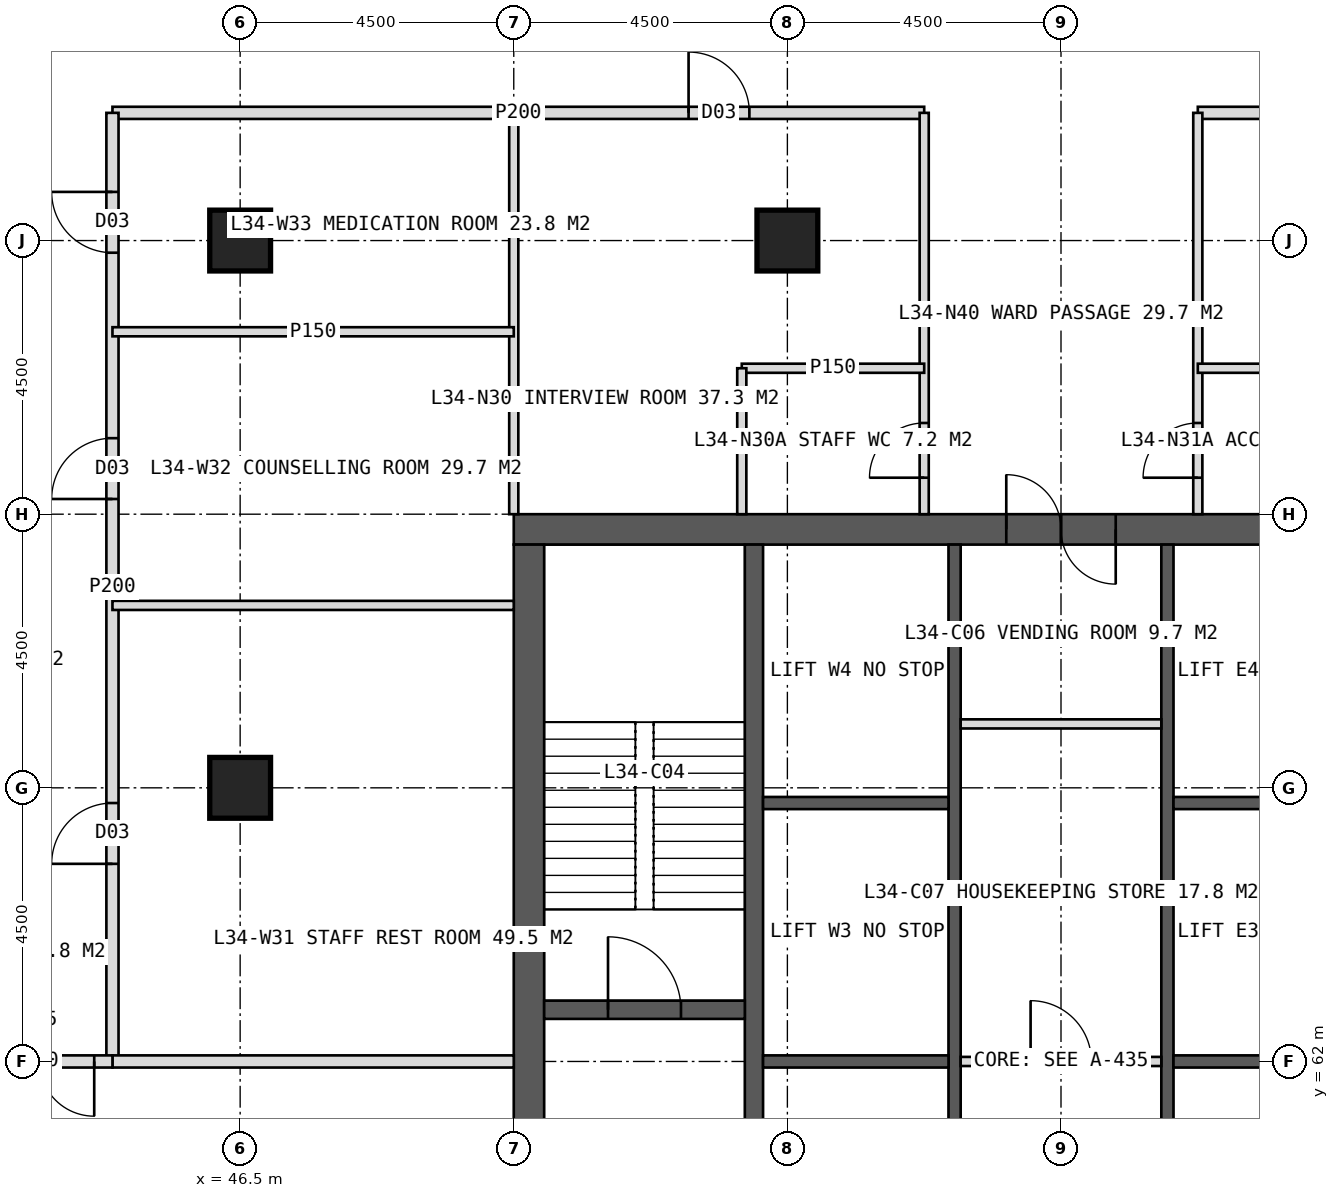
"""IFC4 building model, lengths in metres.
Left out: names, types, materials, properties, quantities, classifications, styles, units other than length and angle.
Written with IfcOpenShell. Run it as: python <this file> out.ifc"""

import sys

from ifc_helpers import new_model, si_unit, direction, frame, frame_2d, origin, origin_2d, place, context, subcontext, project, spatial, rectangle, hollow_rectangle, extrude, element, fill, save


model = new_model("IFC4")
c1 = context("Model", 3, precision=1e-05, world=origin(), true_north=direction((0.0, 1.0)))
c2 = subcontext(c1, "Body", "Model", "MODEL_VIEW")
j1 = project(units=[si_unit("LENGTHUNIT", "METRE"), si_unit("PLANEANGLEUNIT", "RADIAN")], contexts=[c1])
p1 = place(None, origin())
s1 = spatial("IfcSite", under=j1, at=p1, CompositionType="ELEMENT")
p2 = place(p1, origin())
s2 = spatial("IfcBuilding", under=s1, at=p2, CompositionType="ELEMENT")
p3 = place(p2, frame((0.0, 0.0, 144.0)))
s3 = spatial("IfcBuildingStorey", under=s2, at=p3, CompositionType="ELEMENT", Elevation=144.0)
p4 = place(p3, frame((51.0, 70.75, 0.0), z_axis=(0.0, 0.0, 1.0), x_axis=(1.0, 0.0, 0.0)))
e1 = element("IfcWall", 1, at=p4, inside=s3, PredefinedType="SHEAR", context=c2, shape_type="SweptSolid", body=[
    extrude(rectangle(XDim=18.0, YDim=0.5, at=frame_2d((9.0, 0.0))), origin(), (0.0, 0.0, 1.0), 4.0),
])
p5 = place(p4, frame((8.1, 0.0, 0.0)))
e2 = element("IfcOpeningElement", 2, at=p5, cuts=e1, PredefinedType="OPENING", context=c2, shape_type="SweptSolid", body=[
    extrude(rectangle(XDim=1.8, YDim=2.2, at=frame_2d((0.9, 1.1))), frame((0.0, 0.26, 0.0), z_axis=(0.0, -1.0, 0.0), x_axis=(1.0, 0.0, 0.0)), (0.0, 0.0, 1.0), 0.52),
])
p6 = place(p3, frame((51.25, 53.5, 0.0), z_axis=(0.0, 0.0, 1.0), x_axis=(0.0, 1.0, 0.0)))
e3 = element("IfcWall", 3, at=p6, inside=s3, PredefinedType="SHEAR", context=c2, shape_type="SweptSolid", body=[
    extrude(rectangle(XDim=17.0, YDim=0.5, at=frame_2d((8.5, 0.0))), origin(), (0.0, 0.0, 1.0), 4.0),
])
p7 = place(p6, frame((6.0, 0.0, 0.0)))
e4 = element("IfcOpeningElement", 4, at=p7, cuts=e3, PredefinedType="OPENING", context=c2, shape_type="SweptSolid", body=[
    extrude(rectangle(XDim=1.5, YDim=2.2, at=frame_2d((0.75, 1.1))), frame((0.0, 0.26, 0.0), z_axis=(0.0, -1.0, 0.0), x_axis=(1.0, 0.0, 0.0)), (0.0, 0.0, 1.0), 0.52),
])
p8 = place(p3, frame((54.95, 53.5, 0.0), z_axis=(0.0, 0.0, 1.0), x_axis=(0.0, 1.0, 0.0)))
e5 = element("IfcWall", 5, at=p8, inside=s3, PredefinedType="SHEAR", context=c2, shape_type="SweptSolid", body=[
    extrude(rectangle(XDim=17.0, YDim=0.3, at=frame_2d((8.5, 0.0))), origin(), (0.0, 0.0, 1.0), 4.0),
])
p9 = place(p3, frame((58.25, 53.5, 0.0), z_axis=(0.0, 0.0, 1.0), x_axis=(0.0, 1.0, 0.0)))
e6 = element("IfcWall", 6, at=p9, inside=s3, PredefinedType="SHEAR", context=c2, shape_type="SweptSolid", body=[
    extrude(rectangle(XDim=17.0, YDim=0.2, at=frame_2d((8.5, 0.0))), origin(), (0.0, 0.0, 1.0), 4.0),
])
p10 = place(p9, frame((1.375, 0.0, 0.0)))
e7 = element("IfcOpeningElement", 7, at=p10, cuts=e6, PredefinedType="OPENING", context=c2, shape_type="SweptSolid", body=[
    extrude(rectangle(XDim=1.4, YDim=2.2, at=frame_2d((0.7, 1.1))), frame((0.0, 0.11, 0.0), z_axis=(0.0, -1.0, 0.0), x_axis=(1.0, 0.0, 0.0)), (0.0, 0.0, 1.0), 0.22),
])
p11 = place(p9, frame((5.675, 0.0, 0.0)))
e8 = element("IfcOpeningElement", 8, at=p11, cuts=e6, PredefinedType="OPENING", context=c2, shape_type="SweptSolid", body=[
    extrude(rectangle(XDim=1.4, YDim=2.2, at=frame_2d((0.7, 1.1))), frame((0.0, 0.11, 0.0), z_axis=(0.0, -1.0, 0.0), x_axis=(1.0, 0.0, 0.0)), (0.0, 0.0, 1.0), 0.22),
])
p12 = place(p3, frame((61.75, 53.5, 0.0), z_axis=(0.0, 0.0, 1.0), x_axis=(0.0, 1.0, 0.0)))
e9 = element("IfcWall", 9, at=p12, inside=s3, PredefinedType="SHEAR", context=c2, shape_type="SweptSolid", body=[
    extrude(rectangle(XDim=17.0, YDim=0.2, at=frame_2d((8.5, 0.0))), origin(), (0.0, 0.0, 1.0), 4.0),
])
p13 = place(p12, frame((1.375, 0.0, 0.0)))
e10 = element("IfcOpeningElement", 10, at=p13, cuts=e9, PredefinedType="OPENING", context=c2, shape_type="SweptSolid", body=[
    extrude(rectangle(XDim=1.4, YDim=2.2, at=frame_2d((0.7, 1.1))), frame((0.0, 0.11, 0.0), z_axis=(0.0, -1.0, 0.0), x_axis=(1.0, 0.0, 0.0)), (0.0, 0.0, 1.0), 0.22),
])
p14 = place(p12, frame((5.675, 0.0, 0.0)))
e11 = element("IfcOpeningElement", 11, at=p14, cuts=e9, PredefinedType="OPENING", context=c2, shape_type="SweptSolid", body=[
    extrude(rectangle(XDim=1.4, YDim=2.2, at=frame_2d((0.7, 1.1))), frame((0.0, 0.11, 0.0), z_axis=(0.0, -1.0, 0.0), x_axis=(1.0, 0.0, 0.0)), (0.0, 0.0, 1.0), 0.22),
])
for number, where, z_axis, x_axis in (
    (12, (55.1, 62.0, 0.0), (0.0, 0.0, 1.0), (1.0, 0.0, 0.0)),
    (13, (61.85, 62.0, 0.0), (0.0, 0.0, 1.0), (1.0, 0.0, 0.0)),
    (14, (55.1, 66.25, 0.0), (0.0, 0.0, 1.0), (1.0, 0.0, 0.0)),
    (15, (61.85, 66.25, 0.0), (0.0, 0.0, 1.0), (1.0, 0.0, 0.0)),
):
    element("IfcWall", number, at=place(p3, frame(where, z_axis=z_axis, x_axis=x_axis)), inside=s3, PredefinedType="SHEAR", context=c2, shape_type="SweptSolid", body=[
        extrude(rectangle(XDim=3.05, YDim=0.2, at=frame_2d((1.525, 0.0))), origin(), (0.0, 0.0, 1.0), 4.0),
    ])
p15 = place(p3, frame((51.5, 62.85, 0.0), z_axis=(0.0, 0.0, 1.0), x_axis=(1.0, 0.0, 0.0)))
e16 = element("IfcWall", 16, at=p15, inside=s3, PredefinedType="SHEAR", context=c2, shape_type="SweptSolid", body=[
    extrude(rectangle(XDim=3.3, YDim=0.3, at=frame_2d((1.65, 0.0))), origin(), (0.0, 0.0, 1.0), 4.0),
])
p16 = place(p15, frame((1.05, 0.0, 0.0)))
e17 = element("IfcOpeningElement", 17, at=p16, cuts=e16, PredefinedType="OPENING", context=c2, shape_type="SweptSolid", body=[
    extrude(rectangle(XDim=1.2, YDim=2.1, at=frame_2d((0.6, 1.05))), frame((0.0, 0.16, 0.0), z_axis=(0.0, -1.0, 0.0), x_axis=(1.0, 0.0, 0.0)), (0.0, 0.0, 1.0), 0.32),
])
for number, where, z_axis, x_axis in (
    (18, (46.5, 75.5, 0.0), (0.0, 0.0, 1.0), (1.0, 0.0, 0.0)),
    (19, (55.5, 75.5, 0.0), (0.0, 0.0, 1.0), (1.0, 0.0, 0.0)),
    (20, (46.5, 66.5, 0.0), (0.0, 0.0, 1.0), (1.0, 0.0, 0.0)),
):
    element("IfcColumn", number, at=place(p3, frame(where, z_axis=z_axis, x_axis=x_axis)), inside=s3, PredefinedType="COLUMN", context=c2, shape_type="SweptSolid", body=[
        extrude(hollow_rectangle(XDim=1.0, YDim=1.0, WallThickness=0.1, at=origin_2d()), origin(), (0.0, 0.0, 1.0), 4.0),
    ])
p17 = place(p3, frame((51.0, 71.0, 0.0), z_axis=(0.0, 0.0, 1.0), x_axis=(0.0, 1.0, 0.0)))
e21 = element("IfcWall", 21, at=p17, inside=s3, PredefinedType="PARTITIONING", context=c2, shape_type="SweptSolid", body=[
    extrude(rectangle(XDim=6.6, YDim=0.15, at=frame_2d((3.3, 0.0))), origin(), (0.0, 0.0, 1.0), 3.75),
])
p18 = place(p3, frame((44.4, 77.6, 0.0), z_axis=(0.0, 0.0, 1.0), x_axis=(1.0, 0.0, 0.0)))
e22 = element("IfcWall", 22, at=p18, inside=s3, PredefinedType="PARTITIONING", context=c2, shape_type="SweptSolid", body=[
    extrude(rectangle(XDim=13.35, YDim=0.2, at=frame_2d((6.675, 0.0))), origin(), (0.0, 0.0, 1.0), 3.75),
])
p19 = place(p18, frame((9.475, 0.0, 0.0)))
e23 = element("IfcOpeningElement", 23, at=p19, cuts=e22, PredefinedType="OPENING", context=c2, shape_type="SweptSolid", body=[
    extrude(rectangle(XDim=1.0, YDim=2.1, at=frame_2d((0.5, 1.05))), frame((0.0, 0.11, 0.0), z_axis=(0.0, -1.0, 0.0), x_axis=(1.0, 0.0, 0.0)), (0.0, 0.0, 1.0), 0.22),
])
p20 = place(p3, frame((62.25, 77.6, 0.0), z_axis=(0.0, 0.0, 1.0), x_axis=(1.0, 0.0, 0.0)))
e24 = element("IfcWall", 24, at=p20, inside=s3, PredefinedType="PARTITIONING", context=c2, shape_type="SweptSolid", body=[
    extrude(rectangle(XDim=6.75, YDim=0.2, at=frame_2d((3.375, 0.0))), origin(), (0.0, 0.0, 1.0), 3.75),
])
p21 = place(p20, frame((2.125, 0.0, 0.0)))
e25 = element("IfcOpeningElement", 25, at=p21, cuts=e24, PredefinedType="OPENING", context=c2, shape_type="SweptSolid", body=[
    extrude(rectangle(XDim=1.0, YDim=2.1, at=frame_2d((0.5, 1.05))), frame((0.0, 0.11, 0.0), z_axis=(0.0, -1.0, 0.0), x_axis=(1.0, 0.0, 0.0)), (0.0, 0.0, 1.0), 0.22),
])
p22 = place(p3, frame((57.75, 71.0, 0.0), z_axis=(0.0, 0.0, 1.0), x_axis=(0.0, 1.0, 0.0)))
e26 = element("IfcWall", 26, at=p22, inside=s3, PredefinedType="PARTITIONING", context=c2, shape_type="SweptSolid", body=[
    extrude(rectangle(XDim=6.6, YDim=0.15, at=frame_2d((3.3, 0.0))), origin(), (0.0, 0.0, 1.0), 3.75),
])
p23 = place(p22, frame((0.6, 0.0, 0.0)))
e27 = element("IfcOpeningElement", 27, at=p23, cuts=e26, PredefinedType="OPENING", context=c2, shape_type="SweptSolid", body=[
    extrude(rectangle(XDim=0.9, YDim=2.1, at=frame_2d((0.45, 1.05))), frame((0.0, 0.085, 0.0), z_axis=(0.0, -1.0, 0.0), x_axis=(1.0, 0.0, 0.0)), (0.0, 0.0, 1.0), 0.17),
])
p24 = place(p3, frame((62.25, 71.0, 0.0), z_axis=(0.0, 0.0, 1.0), x_axis=(0.0, 1.0, 0.0)))
e28 = element("IfcWall", 28, at=p24, inside=s3, PredefinedType="PARTITIONING", context=c2, shape_type="SweptSolid", body=[
    extrude(rectangle(XDim=6.6, YDim=0.15, at=frame_2d((3.3, 0.0))), origin(), (0.0, 0.0, 1.0), 3.75),
])
p25 = place(p24, frame((0.6, 0.0, 0.0)))
e29 = element("IfcOpeningElement", 29, at=p25, cuts=e28, PredefinedType="OPENING", context=c2, shape_type="SweptSolid", body=[
    extrude(rectangle(XDim=0.9, YDim=2.1, at=frame_2d((0.45, 1.05))), frame((0.0, 0.085, 0.0), z_axis=(0.0, -1.0, 0.0), x_axis=(1.0, 0.0, 0.0)), (0.0, 0.0, 1.0), 0.17),
])
p26 = place(p3, frame((54.75, 73.4, 0.0), z_axis=(0.0, 0.0, 1.0), x_axis=(1.0, 0.0, 0.0)))
e30 = element("IfcWall", 30, at=p26, inside=s3, PredefinedType="PARTITIONING", context=c2, shape_type="SweptSolid", body=[
    extrude(rectangle(XDim=3.0, YDim=0.15, at=frame_2d((1.5, 0.0))), origin(), (0.0, 0.0, 1.0), 3.75),
])
p27 = place(p3, frame((54.75, 71.0, 0.0), z_axis=(0.0, 0.0, 1.0), x_axis=(0.0, 1.0, 0.0)))
e31 = element("IfcWall", 31, at=p27, inside=s3, PredefinedType="PARTITIONING", context=c2, shape_type="SweptSolid", body=[
    extrude(rectangle(XDim=2.4, YDim=0.15, at=frame_2d((1.2, 0.0))), origin(), (0.0, 0.0, 1.0), 3.75),
])
p28 = place(p3, frame((62.25, 73.4, 0.0), z_axis=(0.0, 0.0, 1.0), x_axis=(1.0, 0.0, 0.0)))
e32 = element("IfcWall", 32, at=p28, inside=s3, PredefinedType="PARTITIONING", context=c2, shape_type="SweptSolid", body=[
    extrude(rectangle(XDim=3.0, YDim=0.15, at=frame_2d((1.5, 0.0))), origin(), (0.0, 0.0, 1.0), 3.75),
])
p29 = place(p3, frame((44.4, 62.0, 0.0), z_axis=(0.0, 0.0, 1.0), x_axis=(0.0, 1.0, 0.0)))
e33 = element("IfcWall", 33, at=p29, inside=s3, PredefinedType="PARTITIONING", context=c2, shape_type="SweptSolid", body=[
    extrude(rectangle(XDim=15.6, YDim=0.2, at=frame_2d((7.8, 0.0))), origin(), (0.0, 0.0, 1.0), 3.75),
])
p30 = place(p29, frame((3.25, 0.0, 0.0)))
e34 = element("IfcOpeningElement", 34, at=p30, cuts=e33, PredefinedType="OPENING", context=c2, shape_type="SweptSolid", body=[
    extrude(rectangle(XDim=1.0, YDim=2.1, at=frame_2d((0.5, 1.05))), frame((0.0, 0.11, 0.0), z_axis=(0.0, -1.0, 0.0), x_axis=(1.0, 0.0, 0.0)), (0.0, 0.0, 1.0), 0.22),
])
p31 = place(p29, frame((9.25, 0.0, 0.0)))
e35 = element("IfcOpeningElement", 35, at=p31, cuts=e33, PredefinedType="OPENING", context=c2, shape_type="SweptSolid", body=[
    extrude(rectangle(XDim=1.0, YDim=2.1, at=frame_2d((0.5, 1.05))), frame((0.0, 0.11, 0.0), z_axis=(0.0, -1.0, 0.0), x_axis=(1.0, 0.0, 0.0)), (0.0, 0.0, 1.0), 0.22),
])
p32 = place(p29, frame((13.3, 0.0, 0.0)))
e36 = element("IfcOpeningElement", 36, at=p32, cuts=e33, PredefinedType="OPENING", context=c2, shape_type="SweptSolid", body=[
    extrude(rectangle(XDim=1.0, YDim=2.1, at=frame_2d((0.5, 1.05))), frame((0.0, 0.11, 0.0), z_axis=(0.0, -1.0, 0.0), x_axis=(1.0, 0.0, 0.0)), (0.0, 0.0, 1.0), 0.22),
])
p33 = place(p3, frame((51.0, 62.0, 0.0), z_axis=(0.0, 0.0, 1.0), x_axis=(-1.0, 0.0, 0.0)))
e37 = element("IfcWall", 37, at=p33, inside=s3, PredefinedType="SOLIDWALL", context=c2, shape_type="SweptSolid", body=[
    extrude(rectangle(XDim=6.6, YDim=0.2, at=frame_2d((3.3, 0.0))), origin(), (0.0, 0.0, 1.0), 2.95),
])
for number, where, z_axis, x_axis in (
    (38, (51.0, 69.5, 0.0), (0.0, 0.0, 1.0), (-1.0, 0.0, 0.0)),
    (39, (51.0, 74.0, 0.0), (0.0, 0.0, 1.0), (-1.0, 0.0, 0.0)),
):
    element("IfcWall", number, at=place(p3, frame(where, z_axis=z_axis, x_axis=x_axis)), inside=s3, PredefinedType="PARTITIONING", context=c2, shape_type="SweptSolid", body=[
        extrude(rectangle(XDim=6.6, YDim=0.15, at=frame_2d((3.3, 0.0))), origin(), (0.0, 0.0, 1.0), 3.75),
    ])
p34 = place(p3, frame((44.4, 62.0, 0.0), z_axis=(0.0, 0.0, 1.0), x_axis=(-1.0, 0.0, 0.0)))
e40 = element("IfcWall", 40, at=p34, inside=s3, PredefinedType="SOLIDWALL", context=c2, shape_type="SweptSolid", body=[
    extrude(rectangle(XDim=2.7, YDim=0.2, at=frame_2d((1.35, 0.0))), origin(), (0.0, 0.0, 1.0), 2.95),
])
p35 = place(p34, frame((0.3, 0.0, 0.0)))
e41 = element("IfcOpeningElement", 41, at=p35, cuts=e40, PredefinedType="OPENING", context=c2, shape_type="SweptSolid", body=[
    extrude(rectangle(XDim=1.8, YDim=2.2, at=frame_2d((0.9, 1.1))), frame((0.0, 0.11, 0.0), z_axis=(0.0, -1.0, 0.0), x_axis=(1.0, 0.0, 0.0)), (0.0, 0.0, 1.0), 0.22),
])
p36 = place(p3, frame((58.35, 62.0, 0.0), z_axis=(0.0, 0.0, 1.0), x_axis=(1.0, 0.0, 0.0)))
e42 = element("IfcWall", 42, at=p36, inside=s3, PredefinedType="PARTITIONING", context=c2, shape_type="SweptSolid", body=[
    extrude(rectangle(XDim=3.3, YDim=0.15, at=frame_2d((1.65, 0.0))), origin(), (0.0, 0.0, 1.0), 3.75),
])
p37 = place(p36, frame((1.15, 0.0, 0.0)))
e43 = element("IfcOpeningElement", 43, at=p37, cuts=e42, PredefinedType="OPENING", context=c2, shape_type="SweptSolid", body=[
    extrude(rectangle(XDim=1.0, YDim=2.1, at=frame_2d((0.5, 1.05))), frame((0.0, 0.085, 0.0), z_axis=(0.0, -1.0, 0.0), x_axis=(1.0, 0.0, 0.0)), (0.0, 0.0, 1.0), 0.17),
])
p38 = place(p3, frame((58.35, 67.551, 0.0), z_axis=(0.0, 0.0, 1.0), x_axis=(1.0, 0.0, 0.0)))
e44 = element("IfcWall", 44, at=p38, inside=s3, PredefinedType="PARTITIONING", context=c2, shape_type="SweptSolid", body=[
    extrude(rectangle(XDim=3.3, YDim=0.15, at=frame_2d((1.65, 0.0))), origin(), (0.0, 0.0, 1.0), 3.75),
])
p39 = place(p23, origin())
e45 = element("IfcDoor", 45, at=p39, inside=s3, OperationType="SINGLE_SWING_LEFT", PredefinedType="DOOR", context=c2, shape_type="SweptSolid", body=[
    extrude(rectangle(XDim=0.9, YDim=2.1, at=frame_2d((0.45, 1.05))), frame((0.0, 0.025, 0.0), z_axis=(0.0, -1.0, 0.0), x_axis=(1.0, 0.0, 0.0)), (0.0, 0.0, 1.0), 0.05),
])
fill(e27, e45)
p40 = place(p19, origin())
e46 = element("IfcDoor", 46, at=p40, inside=s3, OperationType="SINGLE_SWING_LEFT", PredefinedType="DOOR", context=c2, shape_type="SweptSolid", body=[
    extrude(rectangle(XDim=1.0, YDim=2.1, at=frame_2d((0.5, 1.05))), frame((0.0, 0.025, 0.0), z_axis=(0.0, -1.0, 0.0), x_axis=(1.0, 0.0, 0.0)), (0.0, 0.0, 1.0), 0.05),
])
fill(e23, e46)
p41 = place(p25, origin())
e47 = element("IfcDoor", 47, at=p41, inside=s3, OperationType="SINGLE_SWING_LEFT", PredefinedType="DOOR", context=c2, shape_type="SweptSolid", body=[
    extrude(rectangle(XDim=0.9, YDim=2.1, at=frame_2d((0.45, 1.05))), frame((0.0, 0.025, 0.0), z_axis=(0.0, -1.0, 0.0), x_axis=(1.0, 0.0, 0.0)), (0.0, 0.0, 1.0), 0.05),
])
fill(e29, e47)
p42 = place(p30, origin())
e48 = element("IfcDoor", 48, at=p42, inside=s3, OperationType="SINGLE_SWING_LEFT", PredefinedType="DOOR", context=c2, shape_type="SweptSolid", body=[
    extrude(rectangle(XDim=1.0, YDim=2.1, at=frame_2d((0.5, 1.05))), frame((0.0, 0.025, 0.0), z_axis=(0.0, -1.0, 0.0), x_axis=(1.0, 0.0, 0.0)), (0.0, 0.0, 1.0), 0.05),
])
fill(e34, e48)
p43 = place(p31, origin())
e49 = element("IfcDoor", 49, at=p43, inside=s3, OperationType="SINGLE_SWING_LEFT", PredefinedType="DOOR", context=c2, shape_type="SweptSolid", body=[
    extrude(rectangle(XDim=1.0, YDim=2.1, at=frame_2d((0.5, 1.05))), frame((0.0, 0.025, 0.0), z_axis=(0.0, -1.0, 0.0), x_axis=(1.0, 0.0, 0.0)), (0.0, 0.0, 1.0), 0.05),
])
fill(e35, e49)
p44 = place(p32, origin())
e50 = element("IfcDoor", 50, at=p44, inside=s3, OperationType="SINGLE_SWING_RIGHT", PredefinedType="DOOR", context=c2, shape_type="SweptSolid", body=[
    extrude(rectangle(XDim=1.0, YDim=2.1, at=frame_2d((0.5, 1.05))), frame((0.0, 0.025, 0.0), z_axis=(0.0, -1.0, 0.0), x_axis=(1.0, 0.0, 0.0)), (0.0, 0.0, 1.0), 0.05),
])
fill(e36, e50)
p45 = place(p35, origin())
e51 = element("IfcDoor", 51, at=p45, inside=s3, OperationType="DOUBLE_DOOR_DOUBLE_SWING", PredefinedType="DOOR", context=c2, shape_type="SweptSolid", body=[
    extrude(rectangle(XDim=1.8, YDim=2.2, at=frame_2d((0.9, 1.1))), frame((0.0, 0.025, 0.0), z_axis=(0.0, -1.0, 0.0), x_axis=(1.0, 0.0, 0.0)), (0.0, 0.0, 1.0), 0.05),
])
fill(e41, e51)
p46 = place(p16, origin())
e52 = element("IfcDoor", 52, at=p46, inside=s3, OperationType="SINGLE_SWING_LEFT", PredefinedType="DOOR", context=c2, shape_type="SweptSolid", body=[
    extrude(rectangle(XDim=1.2, YDim=2.1, at=frame_2d((0.6, 1.05))), frame((0.0, 0.025, 0.0), z_axis=(0.0, -1.0, 0.0), x_axis=(1.0, 0.0, 0.0)), (0.0, 0.0, 1.0), 0.05),
])
fill(e17, e52)
p47 = place(p37, origin())
e53 = element("IfcDoor", 53, at=p47, inside=s3, OperationType="SINGLE_SWING_LEFT", PredefinedType="DOOR", context=c2, shape_type="SweptSolid", body=[
    extrude(rectangle(XDim=1.0, YDim=2.1, at=frame_2d((0.5, 1.05))), frame((0.0, 0.025, 0.0), z_axis=(0.0, -1.0, 0.0), x_axis=(1.0, 0.0, 0.0)), (0.0, 0.0, 1.0), 0.05),
])
fill(e43, e53)
p48 = place(p5, origin())
e54 = element("IfcDoor", 54, at=p48, inside=s3, OperationType="DOUBLE_DOOR_SINGLE_SWING", PredefinedType="DOOR", context=c2, shape_type="SweptSolid", body=[
    extrude(rectangle(XDim=1.8, YDim=2.2, at=frame_2d((0.9, 1.1))), frame((0.0, 0.025, 0.0), z_axis=(0.0, -1.0, 0.0), x_axis=(1.0, 0.0, 0.0)), (0.0, 0.0, 1.0), 0.05),
])
fill(e2, e54)
save(model, sys.argv[1])
